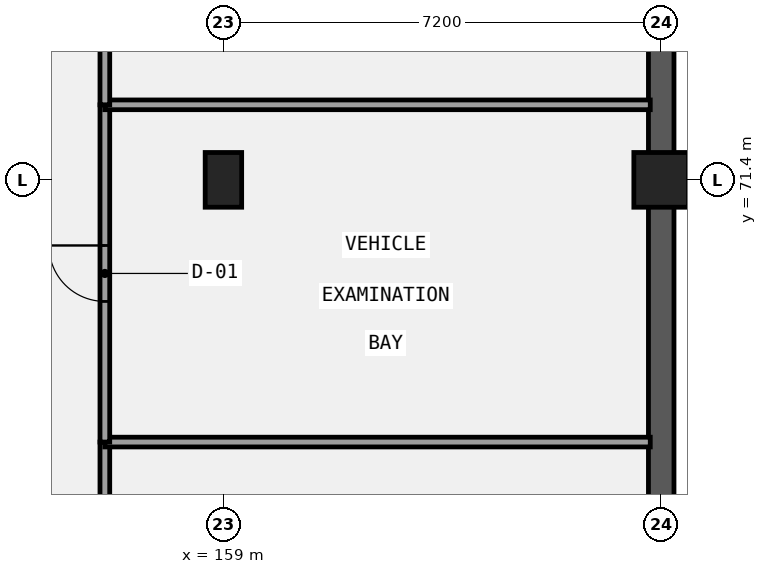
"""IFC4 building model, lengths in metres.
Left out: names, types, materials, properties, quantities, classifications, styles, units other than length and angle.
Written with IfcOpenShell. Run it as: python <this file> out.ifc"""

import sys

from ifc_helpers import new_model, si_unit, direction, frame, frame_2d, origin, origin_2d, place, context, subcontext, project, spatial, rectangle, extrude, element, fill, save


model = new_model("IFC4")
c1 = context("Model", 3, precision=1e-05, world=origin(), true_north=direction((0.0, 1.0)))
c2 = subcontext(c1, "Body", "Model", "MODEL_VIEW")
j1 = project(units=[si_unit("LENGTHUNIT", "METRE"), si_unit("PLANEANGLEUNIT", "RADIAN")], contexts=[c1])
p1 = place(None, origin())
s1 = spatial("IfcSite", under=j1, at=p1, CompositionType="ELEMENT")
p2 = place(p1, origin())
s2 = spatial("IfcBuilding", under=s1, at=p2, CompositionType="ELEMENT")
p3 = place(p2, frame((0.0, 0.0, -4.2)))
s3 = spatial("IfcBuildingStorey", under=s2, at=p3, CompositionType="ELEMENT", Elevation=-4.2)
p4 = place(p3, frame((166.2, 78.4, 0.0), z_axis=(0.0, 0.0, 1.0), x_axis=(0.0, -1.0, 0.0)))
e1 = element("IfcWall", 1, at=p4, inside=s3, PredefinedType="USERDEFINED", context=c2, shape_type="SweptSolid", body=[
    extrude(rectangle(XDim=28.37, YDim=0.42, at=frame_2d((14.185, 0.0))), origin(), (0.0, 0.0, 1.0), 2.88),
])
p5 = place(p3, frame((159.0, 71.4, 0.0), z_axis=(0.0, 0.0, 1.0), x_axis=(1.0, 0.0, 0.0)))
e2 = element("IfcColumn", 2, at=p5, inside=s3, PredefinedType="COLUMN", context=c2, shape_type="SweptSolid", body=[
    extrude(rectangle(XDim=0.6, YDim=0.9, at=origin_2d()), origin(), (0.0, 0.0, 1.0), 4.2),
])
p6 = place(p3, frame((166.2, 71.4, 0.0), z_axis=(0.0, 0.0, 1.0), x_axis=(1.0, 0.0, 0.0)))
e3 = element("IfcColumn", 3, at=p6, inside=s3, PredefinedType="COLUMN", context=c2, shape_type="SweptSolid", body=[
    extrude(rectangle(XDim=0.9, YDim=0.9, at=origin_2d()), origin(), (0.0, 0.0, 1.0), 4.2),
])
p7 = place(p3, frame((157.05, 61.542, 0.0), z_axis=(0.0, 0.0, 1.0), x_axis=(0.0, 1.0, 0.0)))
e4 = element("IfcWall", 4, at=p7, inside=s3, PredefinedType="PARTITIONING", context=c2, shape_type="SweptSolid", body=[
    extrude(rectangle(XDim=5.546, YDim=0.16, at=frame_2d((2.773, 0.0))), origin(), (0.0, 0.0, 1.0), 3.88),
])
p8 = place(p7, frame((0.927, 0.0, 0.0)))
e5 = element("IfcOpeningElement", 5, at=p8, cuts=e4, PredefinedType="OPENING", context=c2, shape_type="SweptSolid", body=[
    extrude(rectangle(XDim=0.92, YDim=2.1, at=frame_2d((0.46, 1.05))), frame((0.0, 0.09, 0.0), z_axis=(0.0, -1.0, 0.0), x_axis=(1.0, 0.0, 0.0)), (0.0, 0.0, 1.0), 0.18),
])
p9 = place(p3, frame((157.05, 67.088, 0.0), z_axis=(0.0, 0.0, 1.0), x_axis=(1.0, 0.0, 0.0)))
e6 = element("IfcWall", 6, at=p9, inside=s3, PredefinedType="PARTITIONING", context=c2, shape_type="SweptSolid", body=[
    extrude(rectangle(XDim=8.97, YDim=0.16, at=frame_2d((4.485, 0.0))), origin(), (0.0, 0.0, 1.0), 3.88),
])
p10 = place(p3, frame((157.05, 67.088, 0.0), z_axis=(0.0, 0.0, 1.0), x_axis=(0.0, 1.0, 0.0)))
e7 = element("IfcWall", 7, at=p10, inside=s3, PredefinedType="PARTITIONING", context=c2, shape_type="SweptSolid", body=[
    extrude(rectangle(XDim=5.546, YDim=0.16, at=frame_2d((2.773, 0.0))), origin(), (0.0, 0.0, 1.0), 3.88),
])
p11 = place(p10, frame((2.313, 0.0, 0.0)))
e8 = element("IfcOpeningElement", 8, at=p11, cuts=e7, PredefinedType="OPENING", context=c2, shape_type="SweptSolid", body=[
    extrude(rectangle(XDim=0.92, YDim=2.1, at=frame_2d((0.46, 1.05))), frame((0.0, 0.09, 0.0), z_axis=(0.0, -1.0, 0.0), x_axis=(1.0, 0.0, 0.0)), (0.0, 0.0, 1.0), 0.18),
])
p12 = place(p3, frame((157.05, 72.634, 0.0), z_axis=(0.0, 0.0, 1.0), x_axis=(1.0, 0.0, 0.0)))
e9 = element("IfcWall", 9, at=p12, inside=s3, PredefinedType="PARTITIONING", context=c2, shape_type="SweptSolid", body=[
    extrude(rectangle(XDim=8.97, YDim=0.16, at=frame_2d((4.485, 0.0))), origin(), (0.0, 0.0, 1.0), 3.88),
])
p13 = place(p3, frame((157.05, 72.634, 0.0), z_axis=(0.0, 0.0, 1.0), x_axis=(0.0, 1.0, 0.0)))
e10 = element("IfcWall", 10, at=p13, inside=s3, PredefinedType="PARTITIONING", context=c2, shape_type="SweptSolid", body=[
    extrude(rectangle(XDim=5.546, YDim=0.16, at=frame_2d((2.773, 0.0))), origin(), (0.0, 0.0, 1.0), 3.88),
])
p14 = place(p13, frame((2.313, 0.0, 0.0)))
e11 = element("IfcOpeningElement", 11, at=p14, cuts=e10, PredefinedType="OPENING", context=c2, shape_type="SweptSolid", body=[
    extrude(rectangle(XDim=0.92, YDim=2.22, at=frame_2d((0.46, 1.11))), frame((0.0, 0.09, 0.0), z_axis=(0.0, -1.0, 0.0), x_axis=(1.0, 0.0, 0.0)), (0.0, 0.0, 1.0), 0.18),
])
p15 = place(p11, origin())
e12 = element("IfcDoor", 12, at=p15, inside=s3, OperationType="SINGLE_SWING_RIGHT", PredefinedType="DOOR", context=c2, shape_type="SweptSolid", body=[
    extrude(rectangle(XDim=0.92, YDim=2.1, at=frame_2d((0.46, 1.05))), frame((0.0, 0.025, 0.0), z_axis=(0.0, -1.0, 0.0), x_axis=(1.0, 0.0, 0.0)), (0.0, 0.0, 1.0), 0.05),
])
fill(e8, e12)
save(model, sys.argv[1])
